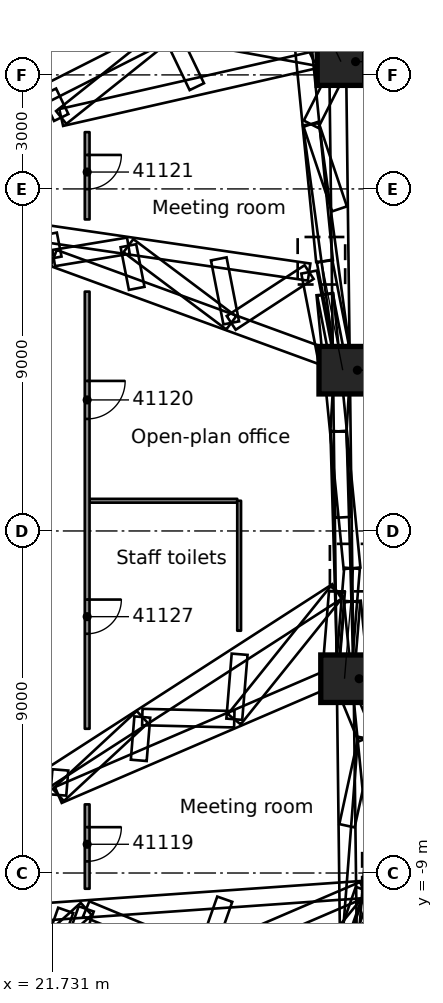
"""IFC4 building model, lengths in metres.
Left out: names, types, materials, properties, quantities, classifications, styles, units other than length and angle.
Written with IfcOpenShell. Run it as: python <this file> out.ifc"""

import sys

from ifc_helpers import new_model, si_unit, direction, frame, frame_2d, origin, origin_2d, place, context, subcontext, project, spatial, rectangle, extrude, element, fill, save


model = new_model("IFC4")
c1 = context("Model", 3, precision=1e-05, world=origin(), true_north=direction((0.0, 1.0)))
c2 = subcontext(c1, "Body", "Model", "MODEL_VIEW")
j1 = project(units=[si_unit("LENGTHUNIT", "METRE"), si_unit("PLANEANGLEUNIT", "RADIAN")], contexts=[c1])
p1 = place(None, origin())
s1 = spatial("IfcSite", under=j1, at=p1, CompositionType="ELEMENT")
p2 = place(p1, origin())
s2 = spatial("IfcBuilding", under=s1, at=p2, CompositionType="ELEMENT")
p3 = place(p2, frame((0.0, 0.0, 206.1)))
s3 = spatial("IfcBuildingStorey", under=s2, at=p3, CompositionType="ELEMENT", Elevation=206.1)
p4 = place(p3, frame((29.329, 12.349, 0.413), z_axis=(-0.286274556016, 0.5954182598, 0.750682339258), x_axis=(-0.901243098623, -0.433313832209, 0.0)))
e1 = element("IfcColumn", 1, at=p4, inside=s3, PredefinedType="COLUMN", context=c2, shape_type="SweptSolid", body=[
    extrude(rectangle(XDim=1.25, YDim=1.25, at=origin_2d()), origin(), (0.0, 0.0, 1.0), 4.761),
])
p5 = place(p3, frame((29.376, 4.23, 0.394), z_axis=(-0.120561844769, 0.618915614767, 0.776149665582), x_axis=(-0.981550812266, -0.191201472119, 0.0)))
e2 = element("IfcColumn", 2, at=p5, inside=s3, PredefinedType="COLUMN", context=c2, shape_type="SweptSolid", body=[
    extrude(rectangle(XDim=1.25, YDim=1.25, at=origin_2d()), origin(), (0.0, 0.0, 1.0), 4.654),
])
p6 = place(p3, frame((29.423, -3.888, 0.394), z_axis=(0.051576127766, 0.628357788529, 0.776212852663), x_axis=(-0.99664829532, 0.081805717627, 0.0)))
e3 = element("IfcColumn", 3, at=p6, inside=s3, PredefinedType="COLUMN", context=c2, shape_type="SweptSolid", body=[
    extrude(rectangle(XDim=1.25, YDim=1.25, at=origin_2d()), origin(), (0.0, 0.0, 1.0), 4.653),
])
p7 = place(p3, frame((29.47, -12.007, 0.413), z_axis=(0.21882689292, 0.623513084536, 0.750563937548), x_axis=(-0.943576164623, 0.331155585117, 0.0)))
e4 = element("IfcColumn", 4, at=p7, inside=s3, PredefinedType="COLUMN", context=c2, shape_type="SweptSolid", body=[
    extrude(rectangle(XDim=1.25, YDim=1.25, at=origin_2d()), origin(), (0.0, 0.0, 1.0), 4.762),
])
p8 = place(p3, frame((22.713, 0.795, 0.0), z_axis=(0.0, 0.0, 1.0), x_axis=(1.0, 0.0, 0.0)))
e5 = element("IfcWall", 5, at=p8, inside=s3, PredefinedType="PARTITIONING", context=c2, shape_type="SweptSolid", body=[
    extrude(rectangle(XDim=3.887, YDim=0.1, at=frame_2d((1.944, 0.0))), origin(), (0.0, 0.0, 1.0), 3.98),
])
p9 = place(p3, frame((26.65, -2.625, 0.0), z_axis=(0.0, 0.0, 1.0), x_axis=(0.0, 1.0, 0.0)))
e6 = element("IfcWall", 6, at=p9, inside=s3, PredefinedType="PARTITIONING", context=c2, shape_type="SweptSolid", body=[
    extrude(rectangle(XDim=3.42, YDim=0.1, at=frame_2d((1.71, 0.0))), origin(), (0.0, 0.0, 1.0), 3.98),
])
p10 = place(p3, frame((22.651, -7.194, 0.0), z_axis=(0.0, 0.0, 1.0), x_axis=(0.0, -1.0, 0.0)))
e7 = element("IfcWall", 7, at=p10, inside=s3, PredefinedType="PARTITIONING", context=c2, shape_type="SweptSolid", body=[
    extrude(rectangle(XDim=2.22, YDim=0.125, at=frame_2d((1.11, 0.0))), origin(), (0.0, 0.0, 1.0), 3.98),
])
p11 = place(p10, frame((0.6, 0.0, 0.0)))
e8 = element("IfcOpeningElement", 8, at=p11, cuts=e7, PredefinedType="OPENING", context=c2, shape_type="SweptSolid", body=[
    extrude(rectangle(XDim=0.9, YDim=2.1, at=frame_2d((0.45, 1.05))), frame((0.0, 0.073, 0.0), z_axis=(0.0, -1.0, 0.0), x_axis=(1.0, 0.0, 0.0)), (0.0, 0.0, 1.0), 0.145),
])
p12 = place(p3, frame((22.651, 6.298, 0.0), z_axis=(0.0, 0.0, 1.0), x_axis=(0.0, -1.0, 0.0)))
e9 = element("IfcWall", 9, at=p12, inside=s3, PredefinedType="PARTITIONING", context=c2, shape_type="SweptSolid", body=[
    extrude(rectangle(XDim=11.503, YDim=0.125, at=frame_2d((5.751, 0.0))), origin(), (0.0, 0.0, 1.0), 3.98),
])
p13 = place(p12, frame((2.35, 0.0, 0.0)))
e10 = element("IfcOpeningElement", 10, at=p13, cuts=e9, PredefinedType="OPENING", context=c2, shape_type="SweptSolid", body=[
    extrude(rectangle(XDim=1.0, YDim=2.1, at=frame_2d((0.5, 1.05))), frame((0.0, 0.073, 0.0), z_axis=(0.0, -1.0, 0.0), x_axis=(1.0, 0.0, 0.0)), (0.0, 0.0, 1.0), 0.145),
])
p14 = place(p12, frame((8.103, 0.0, 0.0)))
e11 = element("IfcOpeningElement", 11, at=p14, cuts=e9, PredefinedType="OPENING", context=c2, shape_type="SweptSolid", body=[
    extrude(rectangle(XDim=0.9, YDim=2.1, at=frame_2d((0.45, 1.05))), frame((0.0, 0.073, 0.0), z_axis=(0.0, -1.0, 0.0), x_axis=(1.0, 0.0, 0.0)), (0.0, 0.0, 1.0), 0.145),
])
p15 = place(p3, frame((22.651, 10.494, 0.0), z_axis=(0.0, 0.0, 1.0), x_axis=(0.0, -1.0, 0.0)))
e12 = element("IfcWall", 12, at=p15, inside=s3, PredefinedType="PARTITIONING", context=c2, shape_type="SweptSolid", body=[
    extrude(rectangle(XDim=2.297, YDim=0.125, at=frame_2d((1.148, 0.0))), origin(), (0.0, 0.0, 1.0), 3.98),
])
p16 = place(p15, frame((0.6, 0.0, 0.0)))
e13 = element("IfcOpeningElement", 13, at=p16, cuts=e12, PredefinedType="OPENING", context=c2, shape_type="SweptSolid", body=[
    extrude(rectangle(XDim=0.9, YDim=2.1, at=frame_2d((0.45, 1.05))), frame((0.0, 0.073, 0.0), z_axis=(0.0, -1.0, 0.0), x_axis=(1.0, 0.0, 0.0)), (0.0, 0.0, 1.0), 0.145),
])
p17 = place(p11, origin())
e14 = element("IfcDoor", 14, at=p17, inside=s3, OperationType="SINGLE_SWING_LEFT", PredefinedType="DOOR", context=c2, shape_type="SweptSolid", body=[
    extrude(rectangle(XDim=0.9, YDim=2.1, at=frame_2d((0.45, 1.05))), frame((0.0, 0.025, 0.0), z_axis=(0.0, -1.0, 0.0), x_axis=(1.0, 0.0, 0.0)), (0.0, 0.0, 1.0), 0.05),
])
fill(e8, e14)
p18 = place(p13, origin())
e15 = element("IfcDoor", 15, at=p18, inside=s3, OperationType="SINGLE_SWING_LEFT", PredefinedType="DOOR", context=c2, shape_type="SweptSolid", body=[
    extrude(rectangle(XDim=1.0, YDim=2.1, at=frame_2d((0.5, 1.05))), frame((0.0, 0.025, 0.0), z_axis=(0.0, -1.0, 0.0), x_axis=(1.0, 0.0, 0.0)), (0.0, 0.0, 1.0), 0.05),
])
fill(e10, e15)
p19 = place(p16, origin())
e16 = element("IfcDoor", 16, at=p19, inside=s3, OperationType="SINGLE_SWING_LEFT", PredefinedType="DOOR", context=c2, shape_type="SweptSolid", body=[
    extrude(rectangle(XDim=0.9, YDim=2.1, at=frame_2d((0.45, 1.05))), frame((0.0, 0.025, 0.0), z_axis=(0.0, -1.0, 0.0), x_axis=(1.0, 0.0, 0.0)), (0.0, 0.0, 1.0), 0.05),
])
fill(e13, e16)
p20 = place(p14, origin())
e17 = element("IfcDoor", 17, at=p20, inside=s3, OperationType="SINGLE_SWING_RIGHT", PredefinedType="DOOR", context=c2, shape_type="SweptSolid", body=[
    extrude(rectangle(XDim=0.9, YDim=2.1, at=frame_2d((0.45, 1.05))), frame((0.0, 0.025, 0.0), z_axis=(0.0, -1.0, 0.0), x_axis=(1.0, 0.0, 0.0)), (0.0, 0.0, 1.0), 0.05),
])
fill(e11, e17)
save(model, sys.argv[1])
